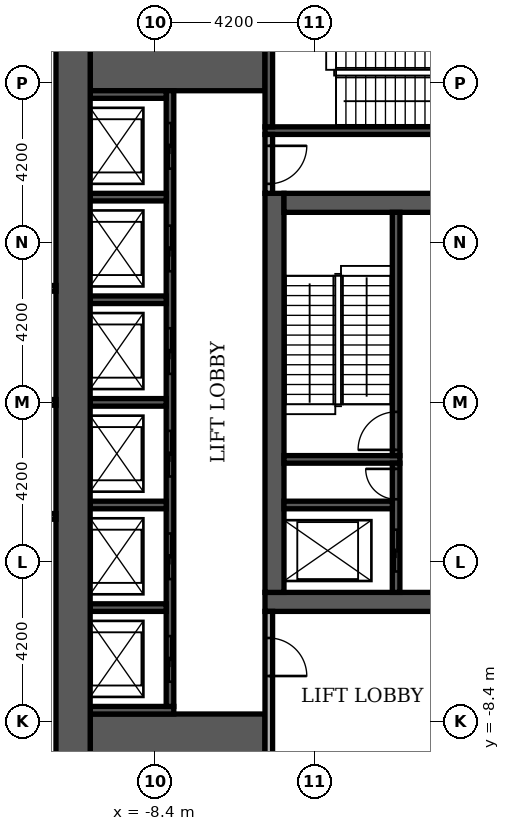
"""IFC4 building model, lengths in metres.
Left out: names, types, materials, properties, quantities, classifications, styles, units other than length and angle.
Written with IfcOpenShell. Run it as: python <this file> out.ifc"""

import sys

from ifc_helpers import new_model, si_unit, direction, frame, frame_2d, origin, place, context, subcontext, project, spatial, rectangle, extrude, element, fill, save


model = new_model("IFC4")
c1 = context("Model", 3, precision=1e-05, world=origin(), true_north=direction((0.0, 1.0)))
c2 = subcontext(c1, "Body", "Model", "MODEL_VIEW")
j1 = project(units=[si_unit("LENGTHUNIT", "METRE"), si_unit("PLANEANGLEUNIT", "RADIAN")], contexts=[c1])
p1 = place(None, origin())
s1 = spatial("IfcSite", under=j1, at=p1, CompositionType="ELEMENT")
p2 = place(p1, origin())
s2 = spatial("IfcBuilding", under=s1, at=p2, CompositionType="ELEMENT")
p3 = place(p2, frame((0.0, 0.0, 12.0)))
s3 = spatial("IfcBuildingStorey", under=s2, at=p3, CompositionType="ELEMENT", Elevation=12.0)
p4 = place(p3, frame((-5.5, -5.25, 0.0), z_axis=(0.0, 0.0, 1.0), x_axis=(1.0, 0.0, 0.0)))
e1 = element("IfcWall", 1, at=p4, inside=s3, PredefinedType="SHEAR", context=c2, shape_type="SweptSolid", body=[
    extrude(rectangle(XDim=11.0, YDim=0.5, at=frame_2d((5.5, 0.0))), origin(), (0.0, 0.0, 1.0), 4.38),
])
p5 = place(p4, frame((4.9, 0.0, 0.0)))
e2 = element("IfcOpeningElement", 2, at=p5, cuts=e1, PredefinedType="OPENING", context=c2, shape_type="SweptSolid", body=[
    extrude(rectangle(XDim=1.2, YDim=2.1, at=frame_2d((0.6, 1.05))), frame((0.0, 0.26, 0.0), z_axis=(0.0, -1.0, 0.0), x_axis=(1.0, 0.0, 0.0)), (0.0, 0.0, 1.0), 0.52),
])
p6 = place(p3, frame((-5.25, -5.0, 0.0), z_axis=(0.0, 0.0, 1.0), x_axis=(0.0, 1.0, 0.0)))
e3 = element("IfcWall", 3, at=p6, inside=s3, PredefinedType="SHEAR", context=c2, shape_type="SweptSolid", body=[
    extrude(rectangle(XDim=10.5, YDim=0.5, at=frame_2d((5.25, 0.0))), origin(), (0.0, 0.0, 1.0), 4.38),
])
p7 = place(p3, frame((-5.0, 5.25, 0.0), z_axis=(0.0, 0.0, 1.0), x_axis=(1.0, 0.0, 0.0)))
e4 = element("IfcWall", 4, at=p7, inside=s3, PredefinedType="SHEAR", context=c2, shape_type="SweptSolid", body=[
    extrude(rectangle(XDim=10.0, YDim=0.5, at=frame_2d((5.0, 0.0))), origin(), (0.0, 0.0, 1.0), 4.38),
])
p8 = place(p7, frame((4.4, 0.0, 0.0)))
e5 = element("IfcOpeningElement", 5, at=p8, cuts=e4, PredefinedType="OPENING", context=c2, shape_type="SweptSolid", body=[
    extrude(rectangle(XDim=1.2, YDim=2.1, at=frame_2d((0.6, 1.05))), frame((0.0, 0.26, 0.0), z_axis=(0.0, -1.0, 0.0), x_axis=(1.0, 0.0, 0.0)), (0.0, 0.0, 1.0), 0.52),
])
for number, where, z_axis, x_axis in (
    (6, (-10.1, -9.15, 0.0), (0.0, 0.0, 1.0), (1.0, 0.0, 0.0)),
    (7, (-10.1, 9.15, 0.0), (0.0, 0.0, 1.0), (1.0, 0.0, 0.0)),
):
    element("IfcWall", number, at=place(p3, frame(where, z_axis=z_axis, x_axis=x_axis)), inside=s3, PredefinedType="SHEAR", context=c2, shape_type="SweptSolid", body=[
        extrude(rectangle(XDim=4.6, YDim=1.9, at=frame_2d((2.3, 0.0))), origin(), (0.0, 0.0, 1.0), 4.38),
    ])
p9 = place(p3, frame((-5.0, -1.5, 0.0), z_axis=(0.0, 0.0, 1.0), x_axis=(1.0, 0.0, 0.0)))
e8 = element("IfcWall", 8, at=p9, inside=s3, PredefinedType="SHEAR", context=c2, shape_type="SweptSolid", body=[
    extrude(rectangle(XDim=3.05, YDim=0.2, at=frame_2d((1.525, 0.0))), origin(), (0.0, 0.0, 1.0), 4.38),
])
p10 = place(p3, frame((-2.05, -1.4, 0.0), z_axis=(0.0, 0.0, 1.0), x_axis=(0.0, 1.0, 0.0)))
e9 = element("IfcWall", 9, at=p10, inside=s3, PredefinedType="SHEAR", context=c2, shape_type="SweptSolid", body=[
    extrude(rectangle(XDim=6.4, YDim=0.2, at=frame_2d((3.2, 0.0))), origin(), (0.0, 0.0, 1.0), 4.38),
])
p11 = place(p10, frame((0.15, 0.0, 0.0)))
e10 = element("IfcOpeningElement", 10, at=p11, cuts=e9, PredefinedType="OPENING", context=c2, shape_type="SweptSolid", body=[
    extrude(rectangle(XDim=1.0, YDim=2.1, at=frame_2d((0.5, 1.05))), frame((0.0, 0.11, 0.0), z_axis=(0.0, -1.0, 0.0), x_axis=(1.0, 0.0, 0.0)), (0.0, 0.0, 1.0), 0.22),
])
p12 = place(p3, frame((-5.5, 7.15, 0.0), z_axis=(0.0, 0.0, 1.0), x_axis=(1.0, 0.0, 0.0)))
e11 = element("IfcWall", 11, at=p12, inside=s3, PredefinedType="SHEAR", context=c2, shape_type="SweptSolid", body=[
    extrude(rectangle(XDim=6.8, YDim=0.2, at=frame_2d((3.4, 0.0))), origin(), (0.0, 0.0, 1.0), 4.38),
])
p13 = place(p3, frame((-5.4, 7.25, 0.0), z_axis=(0.0, 0.0, 1.0), x_axis=(0.0, 1.0, 0.0)))
e12 = element("IfcWall", 12, at=p13, inside=s3, PredefinedType="SHEAR", context=c2, shape_type="SweptSolid", body=[
    extrude(rectangle(XDim=2.85, YDim=0.2, at=frame_2d((1.425, 0.0))), origin(), (0.0, 0.0, 1.0), 4.38),
])
p14 = place(p3, frame((-10.1, -8.1, 0.0), z_axis=(0.0, 0.0, 1.0), x_axis=(1.0, 0.0, 0.0)))
e13 = element("IfcWall", 13, at=p14, inside=s3, PredefinedType="SHEAR", context=c2, shape_type="SweptSolid", body=[
    extrude(rectangle(XDim=2.2, YDim=0.2, at=frame_2d((1.1, 0.0))), origin(), (0.0, 0.0, 1.0), 4.38),
])
p15 = place(p3, frame((-8.0, -8.0, 0.0), z_axis=(0.0, 0.0, 1.0), x_axis=(0.0, 1.0, 0.0)))
e14 = element("IfcWall", 14, at=p15, inside=s3, PredefinedType="SHEAR", context=c2, shape_type="SweptSolid", body=[
    extrude(rectangle(XDim=16.2, YDim=0.2, at=frame_2d((8.1, 0.0))), origin(), (0.0, 0.0, 1.0), 4.38),
])
p16 = place(p15, frame((0.65, 0.0, 0.0)))
e15 = element("IfcOpeningElement", 15, at=p16, cuts=e14, PredefinedType="OPENING", context=c2, shape_type="SweptSolid", body=[
    extrude(rectangle(XDim=1.2, YDim=2.1, at=frame_2d((0.6, 1.05))), frame((0.0, 0.11, 0.0), z_axis=(0.0, -1.0, 0.0), x_axis=(1.0, 0.0, 0.0)), (0.0, 0.0, 1.0), 0.22),
])
p17 = place(p15, frame((3.35, 0.0, 0.0)))
e16 = element("IfcOpeningElement", 16, at=p17, cuts=e14, PredefinedType="OPENING", context=c2, shape_type="SweptSolid", body=[
    extrude(rectangle(XDim=1.2, YDim=2.1, at=frame_2d((0.6, 1.05))), frame((0.0, 0.11, 0.0), z_axis=(0.0, -1.0, 0.0), x_axis=(1.0, 0.0, 0.0)), (0.0, 0.0, 1.0), 0.22),
])
p18 = place(p15, frame((6.05, 0.0, 0.0)))
e17 = element("IfcOpeningElement", 17, at=p18, cuts=e14, PredefinedType="OPENING", context=c2, shape_type="SweptSolid", body=[
    extrude(rectangle(XDim=1.2, YDim=2.1, at=frame_2d((0.6, 1.05))), frame((0.0, 0.11, 0.0), z_axis=(0.0, -1.0, 0.0), x_axis=(1.0, 0.0, 0.0)), (0.0, 0.0, 1.0), 0.22),
])
p19 = place(p15, frame((8.75, 0.0, 0.0)))
e18 = element("IfcOpeningElement", 18, at=p19, cuts=e14, PredefinedType="OPENING", context=c2, shape_type="SweptSolid", body=[
    extrude(rectangle(XDim=1.2, YDim=2.1, at=frame_2d((0.6, 1.05))), frame((0.0, 0.11, 0.0), z_axis=(0.0, -1.0, 0.0), x_axis=(1.0, 0.0, 0.0)), (0.0, 0.0, 1.0), 0.22),
])
p20 = place(p15, frame((11.45, 0.0, 0.0)))
e19 = element("IfcOpeningElement", 19, at=p20, cuts=e14, PredefinedType="OPENING", context=c2, shape_type="SweptSolid", body=[
    extrude(rectangle(XDim=1.2, YDim=2.1, at=frame_2d((0.6, 1.05))), frame((0.0, 0.11, 0.0), z_axis=(0.0, -1.0, 0.0), x_axis=(1.0, 0.0, 0.0)), (0.0, 0.0, 1.0), 0.22),
])
p21 = place(p15, frame((14.15, 0.0, 0.0)))
e20 = element("IfcOpeningElement", 20, at=p21, cuts=e14, PredefinedType="OPENING", context=c2, shape_type="SweptSolid", body=[
    extrude(rectangle(XDim=1.2, YDim=2.1, at=frame_2d((0.6, 1.05))), frame((0.0, 0.11, 0.0), z_axis=(0.0, -1.0, 0.0), x_axis=(1.0, 0.0, 0.0)), (0.0, 0.0, 1.0), 0.22),
])
p22 = place(p3, frame((-10.1, -5.4, 0.0), z_axis=(0.0, 0.0, 1.0), x_axis=(1.0, 0.0, 0.0)))
e21 = element("IfcWall", 21, at=p22, inside=s3, PredefinedType="SHEAR", context=c2, shape_type="SweptSolid", body=[
    extrude(rectangle(XDim=2.0, YDim=0.2, at=frame_2d((1.0, 0.0))), origin(), (0.0, 0.0, 1.0), 4.38),
])
p23 = place(p3, frame((-2.05, -5.0, 0.0), z_axis=(0.0, 0.0, 1.0), x_axis=(0.0, 1.0, 0.0)))
e22 = element("IfcWall", 22, at=p23, inside=s3, PredefinedType="SHEAR", context=c2, shape_type="SweptSolid", body=[
    extrude(rectangle(XDim=3.4, YDim=0.2, at=frame_2d((1.7, 0.0))), origin(), (0.0, 0.0, 1.0), 4.38),
])
p24 = place(p23, frame((0.55, 0.0, 0.0)))
e23 = element("IfcOpeningElement", 23, at=p24, cuts=e22, PredefinedType="OPENING", context=c2, shape_type="SweptSolid", body=[
    extrude(rectangle(XDim=1.1, YDim=2.1, at=frame_2d((0.55, 1.05))), frame((0.0, 0.11, 0.0), z_axis=(0.0, -1.0, 0.0), x_axis=(1.0, 0.0, 0.0)), (0.0, 0.0, 1.0), 0.22),
])
p25 = place(p23, frame((2.45, 0.0, 0.0)))
e24 = element("IfcOpeningElement", 24, at=p25, cuts=e22, PredefinedType="OPENING", context=c2, shape_type="SweptSolid", body=[
    extrude(rectangle(XDim=0.8, YDim=2.1, at=frame_2d((0.4, 1.05))), frame((0.0, 0.11, 0.0), z_axis=(0.0, -1.0, 0.0), x_axis=(1.0, 0.0, 0.0)), (0.0, 0.0, 1.0), 0.22),
])
p26 = place(p3, frame((-10.1, -2.7, 0.0), z_axis=(0.0, 0.0, 1.0), x_axis=(1.0, 0.0, 0.0)))
e25 = element("IfcWall", 25, at=p26, inside=s3, PredefinedType="SHEAR", context=c2, shape_type="SweptSolid", body=[
    extrude(rectangle(XDim=2.0, YDim=0.2, at=frame_2d((1.0, 0.0))), origin(), (0.0, 0.0, 1.0), 4.38),
])
p27 = place(p3, frame((-5.0, -2.7, 0.0), z_axis=(0.0, 0.0, 1.0), x_axis=(1.0, 0.0, 0.0)))
e26 = element("IfcWall", 26, at=p27, inside=s3, PredefinedType="SHEAR", context=c2, shape_type="SweptSolid", body=[
    extrude(rectangle(XDim=2.85, YDim=0.2, at=frame_2d((1.425, 0.0))), origin(), (0.0, 0.0, 1.0), 4.38),
])
for number, where, z_axis, x_axis in (
    (27, (-10.1, 0.0, 0.0), (0.0, 0.0, 1.0), (1.0, 0.0, 0.0)),
    (28, (-10.1, 2.7, 0.0), (0.0, 0.0, 1.0), (1.0, 0.0, 0.0)),
    (29, (-10.1, 5.4, 0.0), (0.0, 0.0, 1.0), (1.0, 0.0, 0.0)),
    (30, (-10.1, 8.1, 0.0), (0.0, 0.0, 1.0), (1.0, 0.0, 0.0)),
):
    element("IfcWall", number, at=place(p3, frame(where, z_axis=z_axis, x_axis=x_axis)), inside=s3, PredefinedType="SHEAR", context=c2, shape_type="SweptSolid", body=[
        extrude(rectangle(XDim=2.0, YDim=0.2, at=frame_2d((1.0, 0.0))), origin(), (0.0, 0.0, 1.0), 4.38),
    ])
p28 = place(p3, frame((-10.55, -10.1, 0.0), z_axis=(0.0, 0.0, 1.0), x_axis=(0.0, 1.0, 0.0)))
e31 = element("IfcWall", 31, at=p28, inside=s3, PredefinedType="SHEAR", context=c2, shape_type="SweptSolid", body=[
    extrude(rectangle(XDim=20.2, YDim=0.9, at=frame_2d((10.1, 0.0))), origin(), (0.0, 0.0, 1.0), 4.38),
])
p29 = place(p3, frame((-5.4, -10.1, 0.0), z_axis=(0.0, 0.0, 1.0), x_axis=(0.0, 1.0, 0.0)))
e32 = element("IfcWall", 32, at=p29, inside=s3, PredefinedType="PARTITIONING", context=c2, shape_type="SweptSolid", body=[
    extrude(rectangle(XDim=4.6, YDim=0.2, at=frame_2d((2.3, 0.0))), origin(), (0.0, 0.0, 1.0), 4.38),
])
p30 = place(p29, frame((2.9, 0.0, 0.0)))
e33 = element("IfcOpeningElement", 33, at=p30, cuts=e32, PredefinedType="OPENING", context=c2, shape_type="SweptSolid", body=[
    extrude(rectangle(XDim=1.0, YDim=2.1, at=frame_2d((0.5, 1.05))), frame((0.0, 0.11, 0.0), z_axis=(0.0, -1.0, 0.0), x_axis=(1.0, 0.0, 0.0)), (0.0, 0.0, 1.0), 0.22),
])
p31 = place(p3, frame((-5.4, 5.5, 0.0), z_axis=(0.0, 0.0, 1.0), x_axis=(0.0, 1.0, 0.0)))
e34 = element("IfcWall", 34, at=p31, inside=s3, PredefinedType="PARTITIONING", context=c2, shape_type="SweptSolid", body=[
    extrude(rectangle(XDim=1.55, YDim=0.2, at=frame_2d((0.775, 0.0))), origin(), (0.0, 0.0, 1.0), 4.38),
])
p32 = place(p31, frame((0.25, 0.0, 0.0)))
e35 = element("IfcOpeningElement", 35, at=p32, cuts=e34, PredefinedType="OPENING", context=c2, shape_type="SweptSolid", body=[
    extrude(rectangle(XDim=1.0, YDim=2.1, at=frame_2d((0.5, 1.05))), frame((0.0, 0.11, 0.0), z_axis=(0.0, -1.0, 0.0), x_axis=(1.0, 0.0, 0.0)), (0.0, 0.0, 1.0), 0.22),
])
p33 = place(p3, frame((-25.1, -3.0, 0.0), z_axis=(0.0, 0.0, 1.0), x_axis=(1.0, 0.0, 0.0)))
e36 = element("IfcWall", 36, at=p33, inside=s3, PredefinedType="PARTITIONING", context=c2, shape_type="SweptSolid", body=[
    extrude(rectangle(XDim=14.1, YDim=0.15, at=frame_2d((7.05, 0.0))), origin(), (0.0, 0.0, 1.0), 4.38),
])
p34 = place(p33, frame((6.5, 0.0, 0.0)))
e37 = element("IfcOpeningElement", 37, at=p34, cuts=e36, PredefinedType="OPENING", context=c2, shape_type="SweptSolid", body=[
    extrude(rectangle(XDim=1.0, YDim=2.1, at=frame_2d((0.5, 1.05))), frame((0.0, 0.085, 0.0), z_axis=(0.0, -1.0, 0.0), x_axis=(1.0, 0.0, 0.0)), (0.0, 0.0, 1.0), 0.17),
])
p35 = place(p3, frame((-24.6, 0.0, 0.0), z_axis=(0.0, 0.0, 1.0), x_axis=(1.0, 0.0, 0.0)))
e38 = element("IfcWall", 38, at=p35, inside=s3, PredefinedType="PARTITIONING", context=c2, shape_type="SweptSolid", body=[
    extrude(rectangle(XDim=13.6, YDim=0.15, at=frame_2d((6.8, 0.0))), origin(), (0.0, 0.0, 1.0), 4.38),
])
p36 = place(p3, frame((-25.1, 3.0, 0.0), z_axis=(0.0, 0.0, 1.0), x_axis=(1.0, 0.0, 0.0)))
e39 = element("IfcWall", 39, at=p36, inside=s3, PredefinedType="PARTITIONING", context=c2, shape_type="SweptSolid", body=[
    extrude(rectangle(XDim=14.1, YDim=0.15, at=frame_2d((7.05, 0.0))), origin(), (0.0, 0.0, 1.0), 4.38),
])
p37 = place(p36, frame((6.5, 0.0, 0.0)))
e40 = element("IfcOpeningElement", 40, at=p37, cuts=e39, PredefinedType="OPENING", context=c2, shape_type="SweptSolid", body=[
    extrude(rectangle(XDim=1.0, YDim=2.1, at=frame_2d((0.5, 1.05))), frame((0.0, 0.085, 0.0), z_axis=(0.0, -1.0, 0.0), x_axis=(1.0, 0.0, 0.0)), (0.0, 0.0, 1.0), 0.17),
])
p38 = place(p16, origin())
e41 = element("IfcDoor", 41, at=p38, inside=s3, OperationType="SLIDING_TO_LEFT", PredefinedType="DOOR", context=c2, shape_type="SweptSolid", body=[
    extrude(rectangle(XDim=1.2, YDim=2.1, at=frame_2d((0.6, 1.05))), frame((0.0, 0.025, 0.0), z_axis=(0.0, -1.0, 0.0), x_axis=(1.0, 0.0, 0.0)), (0.0, 0.0, 1.0), 0.05),
])
fill(e15, e41)
p39 = place(p17, origin())
e42 = element("IfcDoor", 42, at=p39, inside=s3, OperationType="SLIDING_TO_LEFT", PredefinedType="DOOR", context=c2, shape_type="SweptSolid", body=[
    extrude(rectangle(XDim=1.2, YDim=2.1, at=frame_2d((0.6, 1.05))), frame((0.0, 0.025, 0.0), z_axis=(0.0, -1.0, 0.0), x_axis=(1.0, 0.0, 0.0)), (0.0, 0.0, 1.0), 0.05),
])
fill(e16, e42)
p40 = place(p18, origin())
e43 = element("IfcDoor", 43, at=p40, inside=s3, OperationType="SLIDING_TO_LEFT", PredefinedType="DOOR", context=c2, shape_type="SweptSolid", body=[
    extrude(rectangle(XDim=1.2, YDim=2.1, at=frame_2d((0.6, 1.05))), frame((0.0, 0.025, 0.0), z_axis=(0.0, -1.0, 0.0), x_axis=(1.0, 0.0, 0.0)), (0.0, 0.0, 1.0), 0.05),
])
fill(e17, e43)
p41 = place(p19, origin())
e44 = element("IfcDoor", 44, at=p41, inside=s3, OperationType="SLIDING_TO_LEFT", PredefinedType="DOOR", context=c2, shape_type="SweptSolid", body=[
    extrude(rectangle(XDim=1.2, YDim=2.1, at=frame_2d((0.6, 1.05))), frame((0.0, 0.025, 0.0), z_axis=(0.0, -1.0, 0.0), x_axis=(1.0, 0.0, 0.0)), (0.0, 0.0, 1.0), 0.05),
])
fill(e18, e44)
p42 = place(p20, origin())
e45 = element("IfcDoor", 45, at=p42, inside=s3, OperationType="SLIDING_TO_LEFT", PredefinedType="DOOR", context=c2, shape_type="SweptSolid", body=[
    extrude(rectangle(XDim=1.2, YDim=2.1, at=frame_2d((0.6, 1.05))), frame((0.0, 0.025, 0.0), z_axis=(0.0, -1.0, 0.0), x_axis=(1.0, 0.0, 0.0)), (0.0, 0.0, 1.0), 0.05),
])
fill(e19, e45)
p43 = place(p21, origin())
e46 = element("IfcDoor", 46, at=p43, inside=s3, OperationType="SLIDING_TO_LEFT", PredefinedType="DOOR", context=c2, shape_type="SweptSolid", body=[
    extrude(rectangle(XDim=1.2, YDim=2.1, at=frame_2d((0.6, 1.05))), frame((0.0, 0.025, 0.0), z_axis=(0.0, -1.0, 0.0), x_axis=(1.0, 0.0, 0.0)), (0.0, 0.0, 1.0), 0.05),
])
fill(e20, e46)
p44 = place(p24, origin())
e47 = element("IfcDoor", 47, at=p44, inside=s3, OperationType="SLIDING_TO_LEFT", PredefinedType="DOOR", context=c2, shape_type="SweptSolid", body=[
    extrude(rectangle(XDim=1.1, YDim=2.1, at=frame_2d((0.55, 1.05))), frame((0.0, 0.025, 0.0), z_axis=(0.0, -1.0, 0.0), x_axis=(1.0, 0.0, 0.0)), (0.0, 0.0, 1.0), 0.05),
])
fill(e23, e47)
p45 = place(p11, origin())
e48 = element("IfcDoor", 48, at=p45, inside=s3, OperationType="SINGLE_SWING_LEFT", PredefinedType="DOOR", context=c2, shape_type="SweptSolid", body=[
    extrude(rectangle(XDim=1.0, YDim=2.1, at=frame_2d((0.5, 1.05))), frame((0.0, 0.025, 0.0), z_axis=(0.0, -1.0, 0.0), x_axis=(1.0, 0.0, 0.0)), (0.0, 0.0, 1.0), 0.05),
])
fill(e10, e48)
p46 = place(p25, origin())
e49 = element("IfcDoor", 49, at=p46, inside=s3, OperationType="SINGLE_SWING_RIGHT", PredefinedType="DOOR", context=c2, shape_type="SweptSolid", body=[
    extrude(rectangle(XDim=0.8, YDim=2.1, at=frame_2d((0.4, 1.05))), frame((0.0, 0.025, 0.0), z_axis=(0.0, -1.0, 0.0), x_axis=(1.0, 0.0, 0.0)), (0.0, 0.0, 1.0), 0.05),
])
fill(e24, e49)
p47 = place(p32, frame((1.0, 0.0, 0.0), z_axis=(0.0, 0.0, 1.0), x_axis=(-1.0, 0.0, 0.0)))
e50 = element("IfcDoor", 50, at=p47, inside=s3, OperationType="SINGLE_SWING_RIGHT", PredefinedType="DOOR", context=c2, shape_type="SweptSolid", body=[
    extrude(rectangle(XDim=1.0, YDim=2.1, at=frame_2d((0.5, 1.05))), frame((0.0, 0.025, 0.0), z_axis=(0.0, -1.0, 0.0), x_axis=(1.0, 0.0, 0.0)), (0.0, 0.0, 1.0), 0.05),
])
fill(e35, e50)
p48 = place(p30, frame((1.0, 0.0, 0.0), z_axis=(0.0, 0.0, 1.0), x_axis=(-1.0, 0.0, 0.0)))
e51 = element("IfcDoor", 51, at=p48, inside=s3, OperationType="SINGLE_SWING_LEFT", PredefinedType="DOOR", context=c2, shape_type="SweptSolid", body=[
    extrude(rectangle(XDim=1.0, YDim=2.1, at=frame_2d((0.5, 1.05))), frame((0.0, 0.025, 0.0), z_axis=(0.0, -1.0, 0.0), x_axis=(1.0, 0.0, 0.0)), (0.0, 0.0, 1.0), 0.05),
])
fill(e33, e51)
save(model, sys.argv[1])
